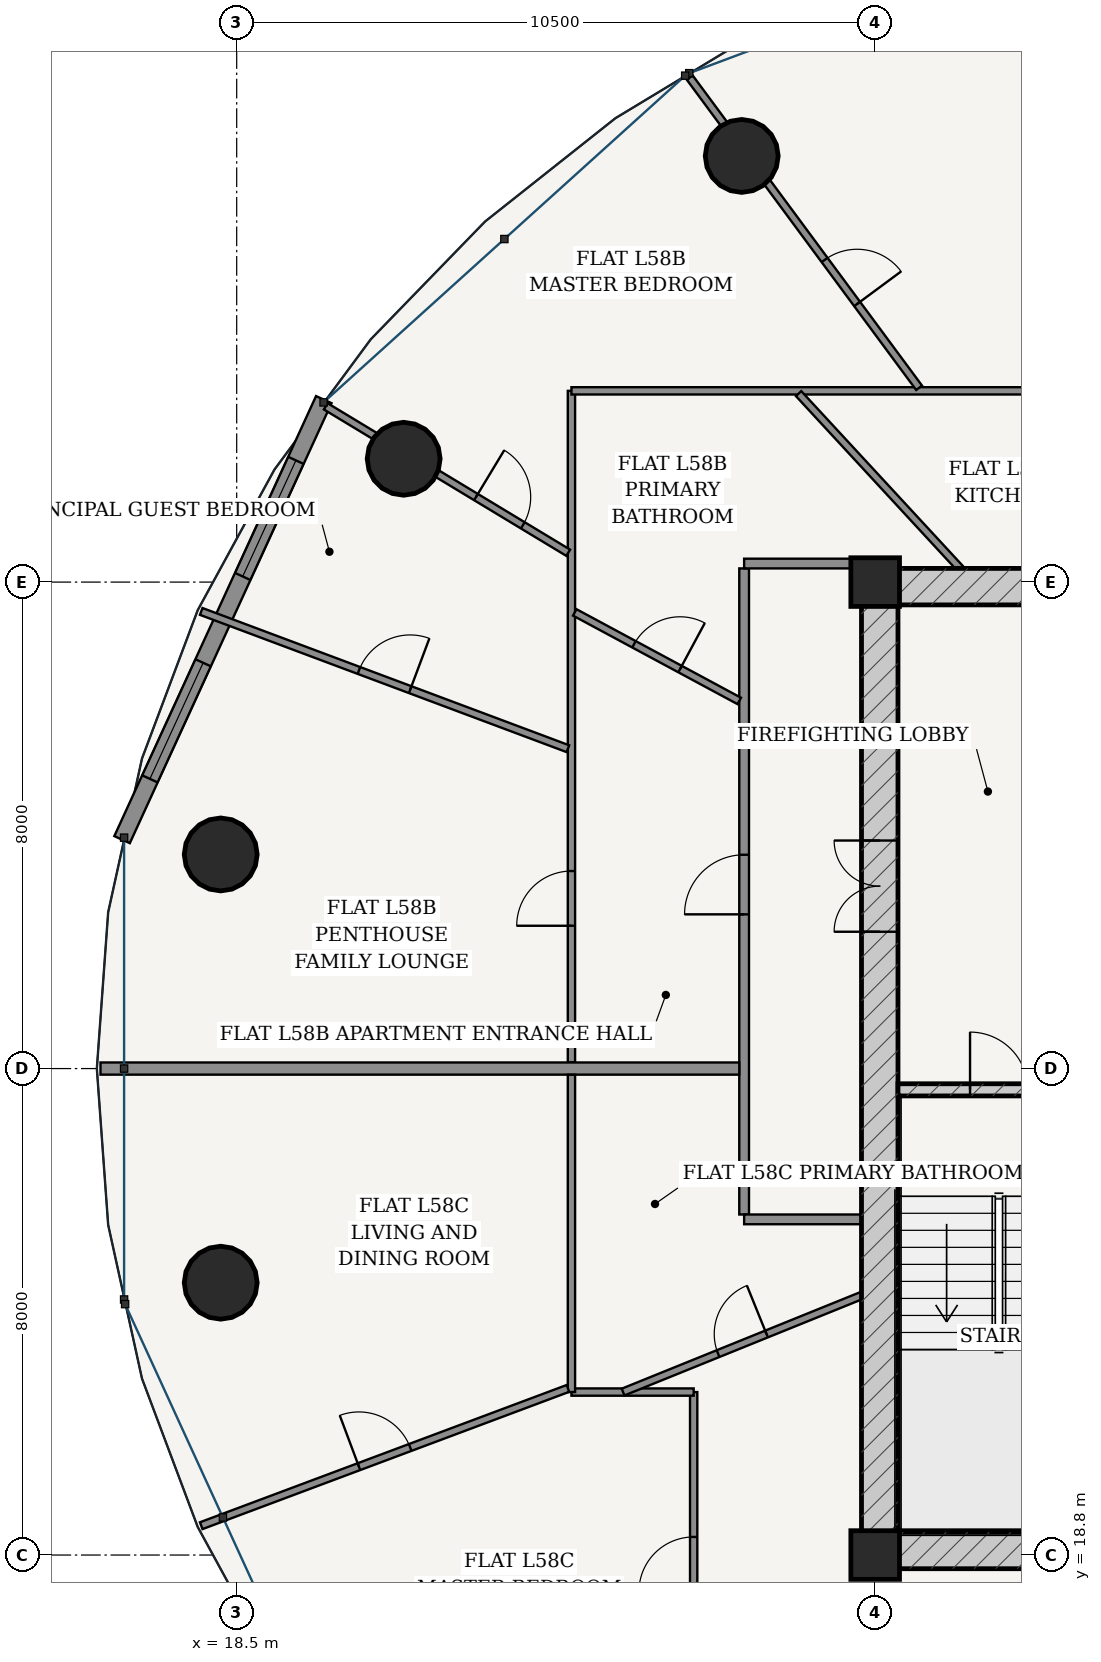
"""IFC4 building model, lengths in metres.
Left out: names, types, materials, properties, quantities, classifications, styles, units other than length and angle.
Written with IfcOpenShell. Run it as: python <this file> out.ifc"""

import sys

from ifc_helpers import new_model, si_unit, direction, frame, frame_2d, origin, origin_2d, place, context, subcontext, project, spatial, rectangle, hollow_circle, extrude, source, transform, mapped, element, fill, save


model = new_model("IFC4")
c1 = context("Model", 3, precision=1e-05, world=origin(), true_north=direction((-0.2419218956, 0.970295726276)))
c2 = subcontext(c1, "Body", "Model", "MODEL_VIEW")
j1 = project(units=[si_unit("LENGTHUNIT", "METRE"), si_unit("PLANEANGLEUNIT", "RADIAN")], contexts=[c1])
p1 = place(None, origin())
s1 = spatial("IfcSite", under=j1, at=p1, CompositionType="ELEMENT")
p2 = place(p1, origin())
s2 = spatial("IfcBuilding", under=s1, at=p2, CompositionType="ELEMENT")
p3 = place(p2, frame((0.0, 0.0, 220.8)))
s3 = spatial("IfcBuildingStorey", under=s2, at=p3, CompositionType="ELEMENT", Elevation=220.8)
for number, where, z_axis, x_axis in (
    (1, (29.0, 18.8, 0.0), (0.0, 0.0, 1.0), (1.0, 0.0, 0.0)),
    (2, (29.0, 34.8, 0.0), (0.0, 0.0, 1.0), (1.0, 0.0, 0.0)),
):
    element("IfcColumn", number, at=place(p3, frame(where, z_axis=z_axis, x_axis=x_axis)), inside=s3, PredefinedType="COLUMN", context=c2, shape_type="SweptSolid", body=[
        extrude(rectangle(XDim=0.8, YDim=0.8, at=origin_2d()), origin(), (0.0, 0.0, 1.0), 3.7),
    ])
p4 = place(p3, frame((28.775, 18.875, 0.0), z_axis=(0.0, 0.0, 1.0), x_axis=(1.0, 0.0, 0.0)))
e3 = element("IfcWall", 3, at=p4, inside=s3, PredefinedType="SHEAR", context=c2, shape_type="SweptSolid", body=[
    extrude(rectangle(XDim=18.45, YDim=0.6, at=frame_2d((9.225, 0.0))), origin(), (0.0, 0.0, 1.0), 3.435),
])
p5 = place(p4, frame((7.46, 0.0, 0.0)))
e4 = element("IfcOpeningElement", 4, at=p5, cuts=e3, PredefinedType="OPENING", context=c2, shape_type="SweptSolid", body=[
    extrude(rectangle(XDim=0.85, YDim=2.1, at=frame_2d((0.425, 1.05))), frame((0.0, 0.31, 0.0), z_axis=(0.0, -1.0, 0.0), x_axis=(1.0, 0.0, 0.0)), (0.0, 0.0, 1.0), 0.62),
])
p6 = place(p4, frame((10.54, 0.0, 0.0)))
e5 = element("IfcOpeningElement", 5, at=p6, cuts=e3, PredefinedType="OPENING", context=c2, shape_type="SweptSolid", body=[
    extrude(rectangle(XDim=0.85, YDim=2.1, at=frame_2d((0.425, 1.05))), frame((0.0, 0.31, 0.0), z_axis=(0.0, -1.0, 0.0), x_axis=(1.0, 0.0, 0.0)), (0.0, 0.0, 1.0), 0.62),
])
p7 = place(p3, frame((28.775, 34.725, 0.0), z_axis=(0.0, 0.0, 1.0), x_axis=(1.0, 0.0, 0.0)))
e6 = element("IfcWall", 6, at=p7, inside=s3, PredefinedType="SHEAR", context=c2, shape_type="SweptSolid", body=[
    extrude(rectangle(XDim=18.45, YDim=0.6, at=frame_2d((9.225, 0.0))), origin(), (0.0, 0.0, 1.0), 3.435),
])
p8 = place(p3, frame((29.075, 19.175, 0.0), z_axis=(0.0, 0.0, 1.0), x_axis=(0.0, 1.0, 0.0)))
e7 = element("IfcWall", 7, at=p8, inside=s3, PredefinedType="SHEAR", context=c2, shape_type="SweptSolid", body=[
    extrude(rectangle(XDim=15.25, YDim=0.6, at=frame_2d((7.625, 0.0))), origin(), (0.0, 0.0, 1.0), 3.435),
])
p9 = place(p8, frame((9.875, 0.0, 0.0)))
e8 = element("IfcOpeningElement", 8, at=p9, cuts=e7, PredefinedType="OPENING", context=c2, shape_type="SweptSolid", body=[
    extrude(rectangle(XDim=1.5, YDim=2.2, at=frame_2d((0.75, 1.1))), frame((0.0, 0.31, 0.0), z_axis=(0.0, -1.0, 0.0), x_axis=(1.0, 0.0, 0.0)), (0.0, 0.0, 1.0), 0.62),
])
p10 = place(p3, frame((29.375, 26.45, 0.0), z_axis=(0.0, 0.0, 1.0), x_axis=(1.0, 0.0, 0.0)))
e9 = element("IfcWall", 9, at=p10, inside=s3, PredefinedType="SOLIDWALL", context=c2, shape_type="SweptSolid", body=[
    extrude(rectangle(XDim=3.32, YDim=0.2, at=frame_2d((1.66, 0.0))), origin(), (0.0, 0.0, 1.0), 3.435),
])
p11 = place(p10, frame((1.185, 0.0, 0.0)))
e10 = element("IfcOpeningElement", 10, at=p11, cuts=e9, PredefinedType="OPENING", context=c2, shape_type="SweptSolid", body=[
    extrude(rectangle(XDim=0.95, YDim=2.15, at=frame_2d((0.475, 1.075))), frame((0.0, 0.11, 0.0), z_axis=(0.0, -1.0, 0.0), x_axis=(1.0, 0.0, 0.0)), (0.0, 0.0, 1.0), 0.22),
])
for number, where, z_axis, x_axis in (
    (11, (26.805, 41.808, 0.0), (0.0, 0.0, 1.0), (1.0, 0.0, 0.0)),
    (12, (21.246, 36.828, 0.0), (0.0, 0.0, 1.0), (1.0, 0.0, 0.0)),
    (13, (18.237, 30.321, 0.0), (0.0, 0.0, 1.0), (1.0, 0.0, 0.0)),
    (14, (18.237, 23.279, 0.0), (0.0, 0.0, 1.0), (1.0, 0.0, 0.0)),
):
    element("IfcColumn", number, at=place(p3, frame(where, z_axis=z_axis, x_axis=x_axis)), inside=s3, PredefinedType="COLUMN", context=c2, shape_type="SweptSolid", body=[
        extrude(hollow_circle(Radius=0.6, WallThickness=0.038, at=origin_2d()), origin(), (0.0, 0.0, 1.0), 3.7),
    ])
p12 = place(p3, frame((19.932, 37.801, 0.0), z_axis=(0.0, 0.0, 1.0), x_axis=(-0.416717018135, -0.909036262641, 0.0)))
e15 = element("IfcWall", 15, at=p12, inside=s3, PredefinedType="SOLIDWALL", context=c2, shape_type="SweptSolid", body=[
    extrude(rectangle(XDim=7.96, YDim=0.28, at=frame_2d((3.98, 0.0))), origin(), (0.0, 0.0, 1.0), 3.435),
])
p13 = place(p12, frame((1.099, 0.0, 0.85)))
e16 = element("IfcOpeningElement", 16, at=p13, cuts=e15, PredefinedType="OPENING", context=c2, shape_type="SweptSolid", body=[
    extrude(rectangle(XDim=2.1, YDim=1.95, at=frame_2d((1.05, 0.975))), frame((0.0, 0.15, 0.0), z_axis=(0.0, -1.0, 0.0), x_axis=(1.0, 0.0, 0.0)), (0.0, 0.0, 1.0), 0.3),
])
p14 = place(p12, frame((4.761, 0.0, 0.85)))
e17 = element("IfcOpeningElement", 17, at=p14, cuts=e15, PredefinedType="OPENING", context=c2, shape_type="SweptSolid", body=[
    extrude(rectangle(XDim=2.1, YDim=1.95, at=frame_2d((1.05, 0.975))), frame((0.0, 0.15, 0.0), z_axis=(0.0, -1.0, 0.0), x_axis=(1.0, 0.0, 0.0)), (0.0, 0.0, 1.0), 0.3),
])
p15 = place(p3, frame((26.845, 24.4, 0.0), z_axis=(0.0, 0.0, 1.0), x_axis=(0.0, 1.0, 0.0)))
e18 = element("IfcWall", 18, at=p15, inside=s3, PredefinedType="PARTITIONING", context=c2, shape_type="SweptSolid", body=[
    extrude(rectangle(XDim=10.625, YDim=0.16, at=frame_2d((5.312, 0.0))), origin(), (0.0, 0.0, 1.0), 2.951),
])
p16 = place(p15, frame((4.936, 0.0, 0.0)))
e19 = element("IfcOpeningElement", 19, at=p16, cuts=e18, PredefinedType="OPENING", context=c2, shape_type="SweptSolid", body=[
    extrude(rectangle(XDim=0.98, YDim=2.2, at=frame_2d((0.49, 1.1))), frame((0.0, 0.09, 0.0), z_axis=(0.0, -1.0, 0.0), x_axis=(1.0, 0.0, 0.0)), (0.0, 0.0, 1.0), 0.18),
])
for number, where, z_axis, x_axis in (
    (20, (26.845, 35.105, 0.0), (0.0, 0.0, 1.0), (1.0, 0.0, 0.0)),
    (21, (26.845, 24.32, 0.0), (0.0, 0.0, 1.0), (1.0, 0.0, 0.0)),
):
    element("IfcWall", number, at=place(p3, frame(where, z_axis=z_axis, x_axis=x_axis)), inside=s3, PredefinedType="PARTITIONING", context=c2, shape_type="SweptSolid", body=[
        extrude(rectangle(XDim=1.93, YDim=0.16, at=frame_2d((0.965, 0.0))), origin(), (0.0, 0.0, 1.0), 3.435),
    ])
p17 = place(p3, frame((24.005, 26.902, 0.0), z_axis=(0.0, 0.0, 1.0), x_axis=(0.0, 1.0, 0.0)))
e22 = element("IfcWall", 22, at=p17, inside=s3, PredefinedType="PARTITIONING", context=c2, shape_type="SweptSolid", body=[
    extrude(rectangle(XDim=11.043, YDim=0.12, at=frame_2d((5.521, 0.0))), origin(), (0.0, 0.0, 1.0), 2.951),
])
p18 = place(p17, frame((2.246, 0.0, 0.0)))
e23 = element("IfcOpeningElement", 23, at=p18, cuts=e22, PredefinedType="OPENING", context=c2, shape_type="SweptSolid", body=[
    extrude(rectangle(XDim=0.9, YDim=2.15, at=frame_2d((0.45, 1.075))), frame((0.0, 0.07, 0.0), z_axis=(0.0, -1.0, 0.0), x_axis=(1.0, 0.0, 0.0)), (0.0, 0.0, 1.0), 0.14),
])
p19 = place(p3, frame((24.005, 37.945, 0.0), z_axis=(0.0, 0.0, 1.0), x_axis=(1.0, 0.0, 0.0)))
e24 = element("IfcWall", 24, at=p19, inside=s3, PredefinedType="PARTITIONING", context=c2, shape_type="SweptSolid", body=[
    extrude(rectangle(XDim=7.69, YDim=0.12, at=frame_2d((3.845, 0.0))), origin(), (0.0, 0.0, 1.0), 2.951),
])
p20 = place(p3, frame((29.722, 37.995, 0.0), z_axis=(0.0, 0.0, 1.0), x_axis=(-0.594518724985, 0.80408176552, 0.0)))
e25 = element("IfcWall", 25, at=p20, inside=s3, PredefinedType="PARTITIONING", context=c2, shape_type="SweptSolid", body=[
    extrude(rectangle(XDim=6.344, YDim=0.12, at=frame_2d((3.172, 0.0))), origin(), (0.0, 0.0, 1.0), 2.951),
])
p21 = place(p20, frame((1.715, 0.0, 0.0)))
e26 = element("IfcOpeningElement", 26, at=p21, cuts=e25, PredefinedType="OPENING", context=c2, shape_type="SweptSolid", body=[
    extrude(rectangle(XDim=0.9, YDim=2.15, at=frame_2d((0.45, 1.075))), frame((0.0, 0.07, 0.0), z_axis=(0.0, -1.0, 0.0), x_axis=(1.0, 0.0, 0.0)), (0.0, 0.0, 1.0), 0.14),
])
p22 = place(p3, frame((23.952, 35.282, 0.0), z_axis=(0.0, 0.0, 1.0), x_axis=(-0.856051317976, 0.516890840499, 0.0)))
e27 = element("IfcWall", 27, at=p22, inside=s3, PredefinedType="PARTITIONING", context=c2, shape_type="SweptSolid", body=[
    extrude(rectangle(XDim=4.658, YDim=0.12, at=frame_2d((2.329, 0.0))), origin(), (0.0, 0.0, 1.0), 2.951),
])
p23 = place(p22, frame((0.872, 0.0, 0.0)))
e28 = element("IfcOpeningElement", 28, at=p23, cuts=e27, PredefinedType="OPENING", context=c2, shape_type="SweptSolid", body=[
    extrude(rectangle(XDim=0.9, YDim=2.15, at=frame_2d((0.45, 1.075))), frame((0.0, 0.07, 0.0), z_axis=(0.0, -1.0, 0.0), x_axis=(1.0, 0.0, 0.0)), (0.0, 0.0, 1.0), 0.14),
])
p24 = place(p3, frame((23.947, 32.06, 0.0), z_axis=(0.0, 0.0, 1.0), x_axis=(-0.936547148815, 0.350541635255, 0.0)))
e29 = element("IfcWall", 29, at=p24, inside=s3, PredefinedType="PARTITIONING", context=c2, shape_type="SweptSolid", body=[
    extrude(rectangle(XDim=6.439, YDim=0.12, at=frame_2d((3.219, 0.0))), origin(), (0.0, 0.0, 1.0), 2.951),
])
p25 = place(p24, frame((2.769, 0.0, 0.0)))
e30 = element("IfcOpeningElement", 30, at=p25, cuts=e29, PredefinedType="OPENING", context=c2, shape_type="SweptSolid", body=[
    extrude(rectangle(XDim=0.9, YDim=2.15, at=frame_2d((0.45, 1.075))), frame((0.0, 0.07, 0.0), z_axis=(0.0, -1.0, 0.0), x_axis=(1.0, 0.0, 0.0)), (0.0, 0.0, 1.0), 0.14),
])
p26 = place(p3, frame((30.396, 35.026, 0.0), z_axis=(0.0, 0.0, 1.0), x_axis=(-0.678759446058, 0.734360684124, 0.0)))
e31 = element("IfcWall", 31, at=p26, inside=s3, PredefinedType="PARTITIONING", context=c2, shape_type="SweptSolid", body=[
    extrude(rectangle(XDim=3.912, YDim=0.12, at=frame_2d((1.956, 0.0))), origin(), (0.0, 0.0, 1.0), 2.951),
])
p27 = place(p3, frame((26.765, 32.845, 0.0), z_axis=(0.0, 0.0, 1.0), x_axis=(-0.88059355453, 0.473872336943, 0.0)))
e32 = element("IfcWall", 32, at=p27, inside=s3, PredefinedType="PARTITIONING", context=c2, shape_type="SweptSolid", body=[
    extrude(rectangle(XDim=3.072, YDim=0.12, at=frame_2d((1.536, 0.0))), origin(), (0.0, 0.0, 1.0), 3.11),
])
p28 = place(p27, frame((1.106, 0.0, 0.0)))
e33 = element("IfcOpeningElement", 33, at=p28, cuts=e32, PredefinedType="OPENING", context=c2, shape_type="SweptSolid", body=[
    extrude(rectangle(XDim=0.86, YDim=2.15, at=frame_2d((0.43, 1.075))), frame((0.0, 0.07, 0.0), z_axis=(0.0, -1.0, 0.0), x_axis=(1.0, 0.0, 0.0)), (0.0, 0.0, 1.0), 0.14),
])
p29 = place(p3, frame((26.765, 26.8, 0.0), z_axis=(0.0, 0.0, 1.0), x_axis=(-1.0, 0.0, 0.0)))
e34 = element("IfcWall", 34, at=p29, inside=s3, PredefinedType="PARTITIONING", context=c2, shape_type="SweptSolid", body=[
    extrude(rectangle(XDim=10.505, YDim=0.2, at=frame_2d((5.252, 0.0))), origin(), (0.0, 0.0, 1.0), 2.951),
])
p30 = place(p3, frame((26.015, 15.815, 0.0), z_axis=(0.0, 0.0, 1.0), x_axis=(0.0, 1.0, 0.0)))
e35 = element("IfcWall", 35, at=p30, inside=s3, PredefinedType="PARTITIONING", context=c2, shape_type="SweptSolid", body=[
    extrude(rectangle(XDim=5.665, YDim=0.12, at=frame_2d((2.833, 0.0))), origin(), (0.0, 0.0, 1.0), 2.951),
])
p31 = place(p30, frame((2.383, 0.0, 0.0)))
e36 = element("IfcOpeningElement", 36, at=p31, cuts=e35, PredefinedType="OPENING", context=c2, shape_type="SweptSolid", body=[
    extrude(rectangle(XDim=0.9, YDim=2.15, at=frame_2d((0.45, 1.075))), frame((0.0, 0.07, 0.0), z_axis=(0.0, -1.0, 0.0), x_axis=(1.0, 0.0, 0.0)), (0.0, 0.0, 1.0), 0.14),
])
p32 = place(p3, frame((26.015, 21.48, 0.0), z_axis=(0.0, 0.0, 1.0), x_axis=(-1.0, 0.0, 0.0)))
e37 = element("IfcWall", 37, at=p32, inside=s3, PredefinedType="PARTITIONING", context=c2, shape_type="SweptSolid", body=[
    extrude(rectangle(XDim=2.01, YDim=0.12, at=frame_2d((1.005, 0.0))), origin(), (0.0, 0.0, 1.0), 3.11),
])
p33 = place(p3, frame((24.005, 21.48, 0.0), z_axis=(0.0, 0.0, 1.0), x_axis=(0.0, 1.0, 0.0)))
e38 = element("IfcWall", 38, at=p33, inside=s3, PredefinedType="PARTITIONING", context=c2, shape_type="SweptSolid", body=[
    extrude(rectangle(XDim=5.218, YDim=0.12, at=frame_2d((2.609, 0.0))), origin(), (0.0, 0.0, 1.0), 2.951),
])
p34 = place(p3, frame((23.947, 21.54, 0.0), z_axis=(0.0, 0.0, 1.0), x_axis=(-0.936534700322, -0.350574892274, 0.0)))
e39 = element("IfcWall", 39, at=p34, inside=s3, PredefinedType="PARTITIONING", context=c2, shape_type="SweptSolid", body=[
    extrude(rectangle(XDim=6.439, YDim=0.12, at=frame_2d((3.219, 0.0))), origin(), (0.0, 0.0, 1.0), 2.951),
])
p35 = place(p34, frame((2.769, 0.0, 0.0)))
e40 = element("IfcOpeningElement", 40, at=p35, cuts=e39, PredefinedType="OPENING", context=c2, shape_type="SweptSolid", body=[
    extrude(rectangle(XDim=0.9, YDim=2.15, at=frame_2d((0.45, 1.075))), frame((0.0, 0.07, 0.0), z_axis=(0.0, -1.0, 0.0), x_axis=(1.0, 0.0, 0.0)), (0.0, 0.0, 1.0), 0.14),
])
p36 = place(p3, frame((28.775, 23.067, 0.0), z_axis=(0.0, 0.0, 1.0), x_axis=(-0.926976443277, -0.375119545757, 0.0)))
e41 = element("IfcWall", 41, at=p36, inside=s3, PredefinedType="PARTITIONING", context=c2, shape_type="SweptSolid", body=[
    extrude(rectangle(XDim=4.23, YDim=0.12, at=frame_2d((2.115, 0.0))), origin(), (0.0, 0.0, 1.0), 3.435),
])
p37 = place(p36, frame((1.685, 0.0, 0.0)))
e42 = element("IfcOpeningElement", 42, at=p37, cuts=e41, PredefinedType="OPENING", context=c2, shape_type="SweptSolid", body=[
    extrude(rectangle(XDim=0.86, YDim=2.15, at=frame_2d((0.43, 1.075))), frame((0.0, 0.07, 0.0), z_axis=(0.0, -1.0, 0.0), x_axis=(1.0, 0.0, 0.0)), (0.0, 0.0, 1.0), 0.14),
])
p38 = place(p3, frame((32.117, 18.575, 0.0), z_axis=(0.0, 0.0, 1.0), x_axis=(-0.581813438478, -0.813322274874, 0.0)))
e43 = element("IfcWall", 43, at=p38, inside=s3, PredefinedType="PARTITIONING", context=c2, shape_type="SweptSolid", body=[
    extrude(rectangle(XDim=3.331, YDim=0.12, at=frame_2d((1.666, 0.0))), origin(), (0.0, 0.0, 1.0), 3.435),
])
p39 = place(p38, frame((1.216, 0.0, 0.0)))
e44 = element("IfcOpeningElement", 44, at=p39, cuts=e43, PredefinedType="OPENING", context=c2, shape_type="SweptSolid", body=[
    extrude(rectangle(XDim=0.9, YDim=2.15, at=frame_2d((0.45, 1.075))), frame((0.0, 0.07, 0.0), z_axis=(0.0, -1.0, 0.0), x_axis=(1.0, 0.0, 0.0)), (0.0, 0.0, 1.0), 0.14),
])
m1 = source(origin(), c2, "Body", "SweptSolid", [
    extrude(rectangle(XDim=2.1, YDim=1.95, at=frame_2d((1.05, 0.975))), frame((0.0, 0.03, 0.0), z_axis=(0.0, -1.0, 0.0), x_axis=(1.0, 0.0, 0.0)), (0.0, 0.0, 1.0), 0.06),
])
p40 = place(p13, origin())
e45 = element("IfcWindow", 45, at=p40, inside=s3, PartitioningType="SINGLE_PANEL", PredefinedType="WINDOW", context=c2, shape_type="MappedRepresentation", body=[
    mapped(m1, transform((0.0, 0.0, 0.0), scale=1.0)),
])
fill(e16, e45)
p41 = place(p14, origin())
e46 = element("IfcWindow", 46, at=p41, inside=s3, PartitioningType="SINGLE_PANEL", PredefinedType="WINDOW", context=c2, shape_type="MappedRepresentation", body=[
    mapped(m1, transform((0.0, 0.0, 0.0), scale=1.0)),
])
fill(e17, e46)
m2 = source(origin(), c2, "Body", "SweptSolid", [
    extrude(rectangle(XDim=1.5, YDim=2.2, at=frame_2d((0.75, 1.1))), frame((0.0, 0.025, 0.0), z_axis=(0.0, -1.0, 0.0), x_axis=(1.0, 0.0, 0.0)), (0.0, 0.0, 1.0), 0.05),
])
p42 = place(p9, origin())
e47 = element("IfcDoor", 47, at=p42, inside=s3, OperationType="DOUBLE_DOOR_SINGLE_SWING", PredefinedType="DOOR", context=c2, shape_type="MappedRepresentation", body=[
    mapped(m2, transform((0.0, 0.0, 0.0), scale=1.0)),
])
fill(e8, e47)
m3 = source(origin(), c2, "Body", "SweptSolid", [
    extrude(rectangle(XDim=0.95, YDim=2.15, at=frame_2d((0.475, 1.075))), frame((0.0, 0.025, 0.0), z_axis=(0.0, -1.0, 0.0), x_axis=(1.0, 0.0, 0.0)), (0.0, 0.0, 1.0), 0.05),
])
p43 = place(p11, origin())
e48 = element("IfcDoor", 48, at=p43, inside=s3, OperationType="SINGLE_SWING_LEFT", PredefinedType="DOOR", context=c2, shape_type="MappedRepresentation", body=[
    mapped(m3, transform((0.0, 0.0, 0.0), scale=1.0)),
])
fill(e10, e48)
m4 = source(origin(), c2, "Body", "SweptSolid", [
    extrude(rectangle(XDim=0.98, YDim=2.2, at=frame_2d((0.49, 1.1))), frame((0.0, 0.025, 0.0), z_axis=(0.0, -1.0, 0.0), x_axis=(1.0, 0.0, 0.0)), (0.0, 0.0, 1.0), 0.05),
])
p44 = place(p16, origin())
e49 = element("IfcDoor", 49, at=p44, inside=s3, OperationType="SINGLE_SWING_LEFT", PredefinedType="DOOR", context=c2, shape_type="MappedRepresentation", body=[
    mapped(m4, transform((0.0, 0.0, 0.0), scale=1.0)),
])
fill(e19, e49)
m5 = source(origin(), c2, "Body", "SweptSolid", [
    extrude(rectangle(XDim=0.86, YDim=2.15, at=frame_2d((0.43, 1.075))), frame((0.0, 0.025, 0.0), z_axis=(0.0, -1.0, 0.0), x_axis=(1.0, 0.0, 0.0)), (0.0, 0.0, 1.0), 0.05),
])
p45 = place(p28, frame((0.86, 0.0, 0.0), z_axis=(0.0, 0.0, 1.0), x_axis=(-1.0, 0.0, 0.0)))
e50 = element("IfcDoor", 50, at=p45, inside=s3, OperationType="SINGLE_SWING_RIGHT", PredefinedType="DOOR", context=c2, shape_type="MappedRepresentation", body=[
    mapped(m5, transform((0.0, 0.0, 0.0), scale=1.0)),
])
fill(e33, e50)
m6 = source(origin(), c2, "Body", "SweptSolid", [
    extrude(rectangle(XDim=0.9, YDim=2.15, at=frame_2d((0.45, 1.075))), frame((0.0, 0.025, 0.0), z_axis=(0.0, -1.0, 0.0), x_axis=(1.0, 0.0, 0.0)), (0.0, 0.0, 1.0), 0.05),
])
p46 = place(p18, origin())
e51 = element("IfcDoor", 51, at=p46, inside=s3, OperationType="SINGLE_SWING_LEFT", PredefinedType="DOOR", context=c2, shape_type="MappedRepresentation", body=[
    mapped(m6, transform((0.0, 0.0, 0.0), scale=1.0)),
])
fill(e23, e51)
p47 = place(p25, frame((0.9, 0.0, 0.0), z_axis=(0.0, 0.0, 1.0), x_axis=(-1.0, 0.0, 0.0)))
e52 = element("IfcDoor", 52, at=p47, inside=s3, OperationType="SINGLE_SWING_RIGHT", PredefinedType="DOOR", context=c2, shape_type="MappedRepresentation", body=[
    mapped(m6, transform((0.0, 0.0, 0.0), scale=1.0)),
])
fill(e30, e52)
p48 = place(p23, frame((0.9, 0.0, 0.0), z_axis=(0.0, 0.0, 1.0), x_axis=(-1.0, 0.0, 0.0)))
e53 = element("IfcDoor", 53, at=p48, inside=s3, OperationType="SINGLE_SWING_LEFT", PredefinedType="DOOR", context=c2, shape_type="MappedRepresentation", body=[
    mapped(m6, transform((0.0, 0.0, 0.0), scale=1.0)),
])
fill(e28, e53)
p49 = place(p21, frame((0.9, 0.0, 0.0), z_axis=(0.0, 0.0, 1.0), x_axis=(-1.0, 0.0, 0.0)))
e54 = element("IfcDoor", 54, at=p49, inside=s3, OperationType="SINGLE_SWING_RIGHT", PredefinedType="DOOR", context=c2, shape_type="MappedRepresentation", body=[
    mapped(m6, transform((0.0, 0.0, 0.0), scale=1.0)),
])
fill(e26, e54)
p50 = place(p31, origin())
e55 = element("IfcDoor", 55, at=p50, inside=s3, OperationType="SINGLE_SWING_LEFT", PredefinedType="DOOR", context=c2, shape_type="MappedRepresentation", body=[
    mapped(m6, transform((0.0, 0.0, 0.0), scale=1.0)),
])
fill(e36, e55)
p51 = place(p37, frame((0.86, 0.0, 0.0), z_axis=(0.0, 0.0, 1.0), x_axis=(-1.0, 0.0, 0.0)))
e56 = element("IfcDoor", 56, at=p51, inside=s3, OperationType="SINGLE_SWING_RIGHT", PredefinedType="DOOR", context=c2, shape_type="MappedRepresentation", body=[
    mapped(m5, transform((0.0, 0.0, 0.0), scale=1.0)),
])
fill(e42, e56)
p52 = place(p35, frame((0.9, 0.0, 0.0), z_axis=(0.0, 0.0, 1.0), x_axis=(-1.0, 0.0, 0.0)))
e57 = element("IfcDoor", 57, at=p52, inside=s3, OperationType="SINGLE_SWING_LEFT", PredefinedType="DOOR", context=c2, shape_type="MappedRepresentation", body=[
    mapped(m6, transform((0.0, 0.0, 0.0), scale=1.0)),
])
fill(e40, e57)
save(model, sys.argv[1])
